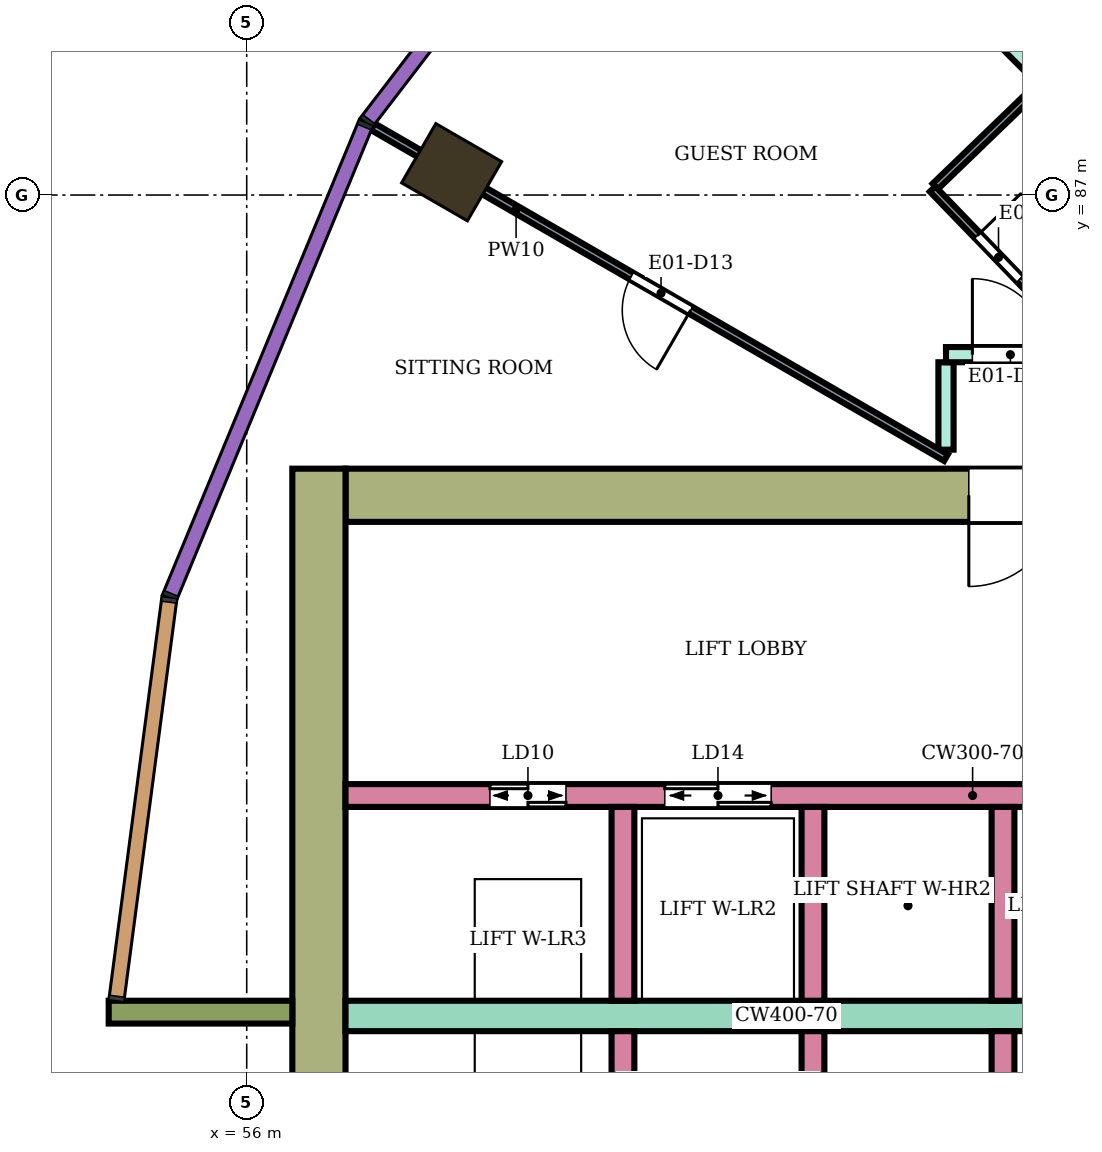
"""IFC4 building model, lengths in metres.
Left out: names, types, materials, properties, quantities, classifications, styles, units other than length and angle.
Written with IfcOpenShell. Run it as: python <this file> out.ifc"""

import sys

from ifc_helpers import new_model, si_unit, direction, frame, frame_2d, origin, origin_2d, place, context, subcontext, project, spatial, rectangle, extrude, element, fill, save


model = new_model("IFC4")
c1 = context("Model", 3, precision=1e-05, world=origin(), true_north=direction((0.0, 1.0)))
c2 = subcontext(c1, "Body", "Model", "MODEL_VIEW")
j1 = project(units=[si_unit("LENGTHUNIT", "METRE"), si_unit("PLANEANGLEUNIT", "RADIAN")], contexts=[c1])
p1 = place(None, origin())
s1 = spatial("IfcSite", under=j1, at=p1, CompositionType="ELEMENT")
p2 = place(p1, origin())
s2 = spatial("IfcBuilding", under=s1, at=p2, CompositionType="ELEMENT")
p3 = place(p2, frame((0.0, 0.0, 122.4)))
s3 = spatial("IfcBuildingStorey", under=s2, at=p3, CompositionType="ELEMENT", Elevation=122.4)
p4 = place(p3, frame((58.696, 87.3, 0.0), z_axis=(0.0, 0.0, 1.0), x_axis=(-0.866025403784, 0.5, 0.0)))
e1 = element("IfcColumn", 1, at=p4, inside=s3, PredefinedType="COLUMN", context=c2, shape_type="SweptSolid", body=[
    extrude(rectangle(XDim=1.0, YDim=0.9, at=origin_2d()), origin(), (0.0, 0.0, 1.0), 3.9),
])
p5 = place(p3, frame((72.1, 83.05, 0.0), z_axis=(0.0, 0.0, 1.0), x_axis=(-1.0, 0.0, 0.0)))
e2 = element("IfcWall", 2, at=p5, inside=s3, PredefinedType="SHEAR", context=c2, shape_type="SweptSolid", body=[
    extrude(rectangle(XDim=14.8, YDim=0.7, at=frame_2d((7.4, 0.0))), origin(), (0.0, 0.0, 1.0), 3.58),
])
p6 = place(p5, frame((4.2, 0.0, 0.0)))
e3 = element("IfcOpeningElement", 3, at=p6, cuts=e2, PredefinedType="OPENING", context=c2, shape_type="SweptSolid", body=[
    extrude(rectangle(XDim=2.4, YDim=2.4, at=frame_2d((1.2, 1.2))), frame((0.0, 0.36, 0.0), z_axis=(0.0, -1.0, 0.0), x_axis=(1.0, 0.0, 0.0)), (0.0, 0.0, 1.0), 0.72),
])
p7 = place(p3, frame((56.95, 83.4, 0.0), z_axis=(0.0, 0.0, 1.0), x_axis=(0.0, -1.0, 0.0)))
e4 = element("IfcWall", 4, at=p7, inside=s3, PredefinedType="SHEAR", context=c2, shape_type="SweptSolid", body=[
    extrude(rectangle(XDim=16.8, YDim=0.7, at=frame_2d((8.4, 0.0))), origin(), (0.0, 0.0, 1.0), 3.58),
])
p8 = place(p3, frame((68.3, 76.2, 0.0), z_axis=(0.0, 0.0, 1.0), x_axis=(-1.0, 0.0, 0.0)))
e5 = element("IfcWall", 5, at=p8, inside=s3, PredefinedType="SHEAR", context=c2, shape_type="SweptSolid", body=[
    extrude(rectangle(XDim=11.0, YDim=0.4, at=frame_2d((5.5, 0.0))), origin(), (0.0, 0.0, 1.0), 3.58),
])
p9 = place(p3, frame((68.3, 79.1, 0.0), z_axis=(0.0, 0.0, 1.0), x_axis=(-1.0, 0.0, 0.0)))
e6 = element("IfcWall", 6, at=p9, inside=s3, PredefinedType="SHEAR", context=c2, shape_type="SweptSolid", body=[
    extrude(rectangle(XDim=11.0, YDim=0.3, at=frame_2d((5.5, 0.0))), origin(), (0.0, 0.0, 1.0), 3.58),
])
p10 = place(p9, frame((0.4, 0.0, 0.0)))
e7 = element("IfcOpeningElement", 7, at=p10, cuts=e6, PredefinedType="OPENING", context=c2, shape_type="SweptSolid", body=[
    extrude(rectangle(XDim=1.4, YDim=2.1, at=frame_2d((0.7, 1.05))), frame((0.0, 0.16, 0.0), z_axis=(0.0, -1.0, 0.0), x_axis=(1.0, 0.0, 0.0)), (0.0, 0.0, 1.0), 0.32),
])
p11 = place(p9, frame((5.4, 0.0, 0.0)))
e8 = element("IfcOpeningElement", 8, at=p11, cuts=e6, PredefinedType="OPENING", context=c2, shape_type="SweptSolid", body=[
    extrude(rectangle(XDim=1.4, YDim=2.1, at=frame_2d((0.7, 1.05))), frame((0.0, 0.16, 0.0), z_axis=(0.0, -1.0, 0.0), x_axis=(1.0, 0.0, 0.0)), (0.0, 0.0, 1.0), 0.32),
])
p12 = place(p9, frame((8.1, 0.0, 0.0)))
e9 = element("IfcOpeningElement", 9, at=p12, cuts=e6, PredefinedType="OPENING", context=c2, shape_type="SweptSolid", body=[
    extrude(rectangle(XDim=1.0, YDim=2.1, at=frame_2d((0.5, 1.05))), frame((0.0, 0.16, 0.0), z_axis=(0.0, -1.0, 0.0), x_axis=(1.0, 0.0, 0.0)), (0.0, 0.0, 1.0), 0.32),
])
for number, where, z_axis, x_axis in (
    (10, (65.95, 76.0, 0.0), (0.0, 0.0, 1.0), (0.0, -1.0, 0.0)),
    (11, (63.45, 76.0, 0.0), (0.0, 0.0, 1.0), (0.0, -1.0, 0.0)),
    (12, (60.95, 76.0, 0.0), (0.0, 0.0, 1.0), (0.0, -1.0, 0.0)),
    (13, (65.95, 78.95, 0.0), (0.0, 0.0, 1.0), (0.0, -1.0, 0.0)),
    (14, (63.45, 78.95, 0.0), (0.0, 0.0, 1.0), (0.0, -1.0, 0.0)),
    (15, (60.95, 78.95, 0.0), (0.0, 0.0, 1.0), (0.0, -1.0, 0.0)),
):
    element("IfcWall", number, at=place(p3, frame(where, z_axis=z_axis, x_axis=x_axis)), inside=s3, PredefinedType="SHEAR", context=c2, shape_type="SweptSolid", body=[
        extrude(rectangle(XDim=2.55, YDim=0.3, at=frame_2d((1.275, 0.0))), origin(), (0.0, 0.0, 1.0), 3.58),
    ])
p13 = place(p3, frame((56.6, 76.25, 0.0), z_axis=(0.0, 0.0, 1.0), x_axis=(-1.0, 0.0, 0.0)))
e16 = element("IfcWall", 16, at=p13, inside=s3, PredefinedType="NOTDEFINED", context=c2, shape_type="SweptSolid", body=[
    extrude(rectangle(XDim=2.416, YDim=0.3, at=frame_2d((1.208, 0.0))), origin(), (0.0, 0.0, 1.0), 3.9),
])
p14 = place(p3, frame((63.598, 91.408, 0.0), z_axis=(0.0, 0.0, 1.0), x_axis=(0.706963264491, -0.707250268759, 0.0)))
e17 = element("IfcWall", 17, at=p14, inside=s3, PredefinedType="PARTITIONING", context=c2, shape_type="SweptSolid", body=[
    extrude(rectangle(XDim=6.805, YDim=0.2, at=frame_2d((3.403, 0.0))), origin(), (0.0, 0.0, 1.0), 3.45),
])
p15 = place(p3, frame((65.2, 83.65, 0.0), z_axis=(0.0, 0.0, 1.0), x_axis=(0.0, 1.0, 0.0)))
e18 = element("IfcWall", 18, at=p15, inside=s3, PredefinedType="PARTITIONING", context=c2, shape_type="SweptSolid", body=[
    extrude(rectangle(XDim=1.15, YDim=0.2, at=frame_2d((0.575, 0.0))), origin(), (0.0, 0.0, 1.0), 3.45),
])
p16 = place(p3, frame((65.2, 84.9, 0.0), z_axis=(0.0, 0.0, 1.0), x_axis=(1.0, 0.0, 0.0)))
e19 = element("IfcWall", 19, at=p16, inside=s3, PredefinedType="PARTITIONING", context=c2, shape_type="SweptSolid", body=[
    extrude(rectangle(XDim=1.537, YDim=0.2, at=frame_2d((0.769, 0.0))), origin(), (0.0, 0.0, 1.0), 3.45),
])
p17 = place(p16, frame((0.347, 0.0, 0.0)))
e20 = element("IfcOpeningElement", 20, at=p17, cuts=e19, PredefinedType="OPENING", context=c2, shape_type="SweptSolid", body=[
    extrude(rectangle(XDim=1.0, YDim=2.1, at=frame_2d((0.5, 1.05))), frame((0.0, 0.11, 0.0), z_axis=(0.0, -1.0, 0.0), x_axis=(1.0, 0.0, 0.0)), (0.0, 0.0, 1.0), 0.22),
])
p18 = place(p3, frame((57.659, 87.899, 0.0), z_axis=(0.0, 0.0, 1.0), x_axis=(0.86602264145, -0.500004784474, 0.0)))
e21 = element("IfcWall", 21, at=p18, inside=s3, PredefinedType="PARTITIONING", context=c2, shape_type="SweptSolid", body=[
    extrude(rectangle(XDim=8.708, YDim=0.1, at=frame_2d((4.354, 0.0))), origin(), (0.0, 0.0, 1.0), 3.45),
])
p19 = place(p18, frame((3.929, 0.0, 0.0)))
e22 = element("IfcOpeningElement", 22, at=p19, cuts=e21, PredefinedType="OPENING", context=c2, shape_type="SweptSolid", body=[
    extrude(rectangle(XDim=0.9, YDim=2.1, at=frame_2d((0.45, 1.05))), frame((0.0, 0.06, 0.0), z_axis=(0.0, -1.0, 0.0), x_axis=(1.0, 0.0, 0.0)), (0.0, 0.0, 1.0), 0.12),
])
p20 = place(p3, frame((65.059, 87.114, 0.0), z_axis=(0.0, 0.0, 1.0), x_axis=(0.719715847356, 0.694268751324, 0.0)))
e23 = element("IfcWall", 23, at=p20, inside=s3, PredefinedType="PARTITIONING", context=c2, shape_type="SweptSolid", body=[
    extrude(rectangle(XDim=1.9, YDim=0.1, at=frame_2d((0.95, 0.0))), origin(), (0.0, 0.0, 1.0), 3.45),
])
p21 = place(p3, frame((65.023, 87.079, 0.0), z_axis=(0.0, 0.0, 1.0), x_axis=(0.694287838235, -0.719697434815, 0.0)))
e24 = element("IfcWall", 24, at=p21, inside=s3, PredefinedType="PARTITIONING", context=c2, shape_type="SweptSolid", body=[
    extrude(rectangle(XDim=2.7, YDim=0.1, at=frame_2d((1.35, 0.0))), origin(), (0.0, 0.0, 1.0), 3.45),
])
p22 = place(p21, frame((0.85, 0.0, 0.0)))
e25 = element("IfcOpeningElement", 25, at=p22, cuts=e24, PredefinedType="OPENING", context=c2, shape_type="SweptSolid", body=[
    extrude(rectangle(XDim=0.8, YDim=2.1, at=frame_2d((0.4, 1.05))), frame((0.0, 0.06, 0.0), z_axis=(0.0, -1.0, 0.0), x_axis=(1.0, 0.0, 0.0)), (0.0, 0.0, 1.0), 0.12),
])
p23 = place(p17, origin())
e26 = element("IfcDoor", 26, at=p23, inside=s3, OperationType="SINGLE_SWING_LEFT", PredefinedType="DOOR", context=c2, shape_type="SweptSolid", body=[
    extrude(rectangle(XDim=1.0, YDim=2.1, at=frame_2d((0.5, 1.05))), frame((0.0, 0.025, 0.0), z_axis=(0.0, -1.0, 0.0), x_axis=(1.0, 0.0, 0.0)), (0.0, 0.0, 1.0), 0.05),
])
fill(e20, e26)
p24 = place(p22, origin())
e27 = element("IfcDoor", 27, at=p24, inside=s3, OperationType="SINGLE_SWING_LEFT", PredefinedType="DOOR", context=c2, shape_type="SweptSolid", body=[
    extrude(rectangle(XDim=0.8, YDim=2.1, at=frame_2d((0.4, 1.05))), frame((0.0, 0.025, 0.0), z_axis=(0.0, -1.0, 0.0), x_axis=(1.0, 0.0, 0.0)), (0.0, 0.0, 1.0), 0.05),
])
fill(e25, e27)
p25 = place(p19, frame((0.9, 0.0, 0.0), z_axis=(0.0, 0.0, 1.0), x_axis=(-1.0, 0.0, 0.0)))
e28 = element("IfcDoor", 28, at=p25, inside=s3, OperationType="SINGLE_SWING_LEFT", PredefinedType="DOOR", context=c2, shape_type="SweptSolid", body=[
    extrude(rectangle(XDim=0.9, YDim=2.1, at=frame_2d((0.45, 1.05))), frame((0.0, 0.025, 0.0), z_axis=(0.0, -1.0, 0.0), x_axis=(1.0, 0.0, 0.0)), (0.0, 0.0, 1.0), 0.05),
])
fill(e22, e28)
p26 = place(p11, origin())
e29 = element("IfcDoor", 29, at=p26, inside=s3, OperationType="DOUBLE_DOOR_SLIDING", PredefinedType="DOOR", context=c2, shape_type="SweptSolid", body=[
    extrude(rectangle(XDim=1.4, YDim=2.1, at=frame_2d((0.7, 1.05))), frame((0.0, 0.025, 0.0), z_axis=(0.0, -1.0, 0.0), x_axis=(1.0, 0.0, 0.0)), (0.0, 0.0, 1.0), 0.05),
])
fill(e8, e29)
p27 = place(p12, origin())
e30 = element("IfcDoor", 30, at=p27, inside=s3, OperationType="DOUBLE_DOOR_SLIDING", PredefinedType="DOOR", context=c2, shape_type="SweptSolid", body=[
    extrude(rectangle(XDim=1.0, YDim=2.1, at=frame_2d((0.5, 1.05))), frame((0.0, 0.025, 0.0), z_axis=(0.0, -1.0, 0.0), x_axis=(1.0, 0.0, 0.0)), (0.0, 0.0, 1.0), 0.05),
])
fill(e9, e30)
p28 = place(p6, origin())
e31 = element("IfcDoor", 31, at=p28, inside=s3, OperationType="DOUBLE_DOOR_SINGLE_SWING", PredefinedType="DOOR", context=c2, shape_type="SweptSolid", body=[
    extrude(rectangle(XDim=2.4, YDim=2.4, at=frame_2d((1.2, 1.2))), frame((0.0, 0.025, 0.0), z_axis=(0.0, -1.0, 0.0), x_axis=(1.0, 0.0, 0.0)), (0.0, 0.0, 1.0), 0.05),
])
fill(e3, e31)
save(model, sys.argv[1])
